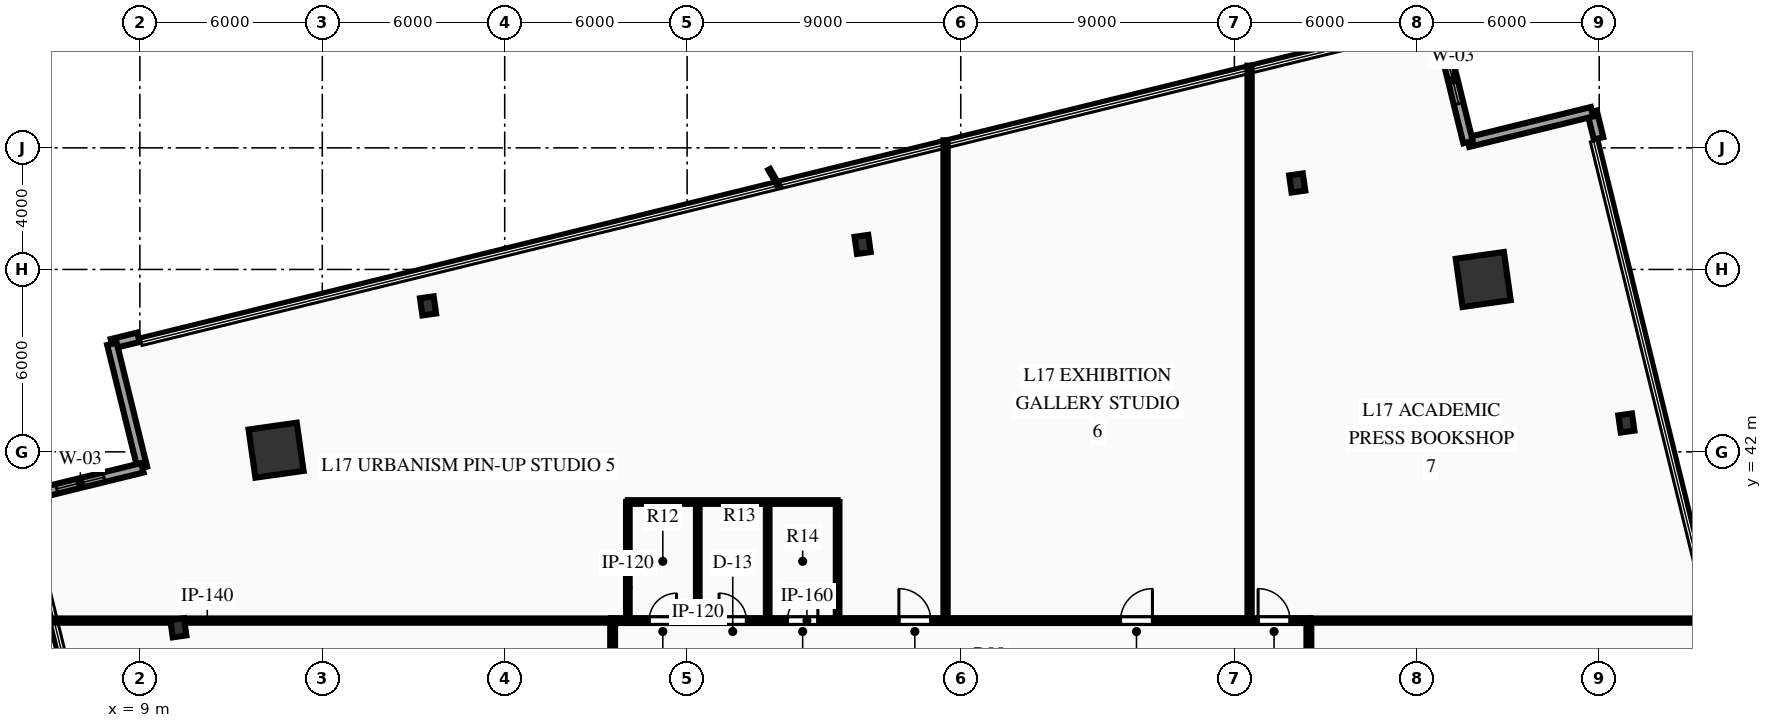
"""IFC4 building model, lengths in metres.
Left out: names, types, materials, properties, quantities, classifications, styles, units other than length and angle.
Written with IfcOpenShell. Run it as: python <this file> out.ifc"""

import sys

from ifc_helpers import new_model, si_unit, direction, frame, frame_2d, origin, origin_2d, place, context, subcontext, project, spatial, rectangle, hollow_rectangle, i_section, extrude, element, fill, save


model = new_model("IFC4")
c1 = context("Model", 3, precision=1e-05, world=origin(), true_north=direction((0.0, 1.0)))
c2 = subcontext(c1, "Body", "Model", "MODEL_VIEW")
j1 = project(units=[si_unit("LENGTHUNIT", "METRE"), si_unit("PLANEANGLEUNIT", "RADIAN")], contexts=[c1])
p1 = place(None, origin())
s1 = spatial("IfcSite", under=j1, at=p1, CompositionType="ELEMENT")
p2 = place(p1, origin())
s2 = spatial("IfcBuilding", under=s1, at=p2, CompositionType="ELEMENT")
p3 = place(p2, frame((0.0, 0.0, 73.95)))
s3 = spatial("IfcBuildingStorey", under=s2, at=p3, CompositionType="ELEMENT", Elevation=73.95)
for number, where, z_axis, x_axis in (
    (1, (53.185, 47.67, 0.0), (0.0, 0.0, 1.0), (0.99, 0.14, 0.0)),
    (2, (13.48, 42.054, 0.0), (0.0, 0.0, 1.0), (0.99, 0.14, 0.0)),
):
    element("IfcColumn", number, at=place(p3, frame(where, z_axis=z_axis, x_axis=x_axis)), inside=s3, PredefinedType="COLUMN", context=c2, shape_type="SweptSolid", body=[
        extrude(hollow_rectangle(XDim=1.6, YDim=1.6, WallThickness=0.08, at=origin_2d()), origin(), (0.0, 0.0, 1.0), 3.75),
    ])
for number, where, z_axis, x_axis in (
    (3, (57.892, 42.949, 0.0), (0.0, 0.0, 1.0), (0.99, 0.14, 0.0)),
    (4, (47.066, 50.844, 0.0), (0.0, 0.0, 1.0), (0.99, 0.14, 0.0)),
    (5, (32.772, 48.823, 0.0), (0.0, 0.0, 1.0), (0.99, 0.14, 0.0)),
    (6, (18.479, 46.801, 0.0), (0.0, 0.0, 1.0), (0.99, 0.14, 0.0)),
    (7, (10.266, 36.213, 0.0), (0.0, 0.0, 1.0), (0.99, 0.14, 0.0)),
):
    element("IfcColumn", number, at=place(p3, frame(where, z_axis=z_axis, x_axis=x_axis)), inside=s3, PredefinedType="COLUMN", context=c2, shape_type="SweptSolid", body=[
        extrude(i_section(OverallWidth=0.454, OverallDepth=0.569, WebThickness=0.078, FlangeThickness=0.125, at=origin_2d()), origin(), (0.0, 0.0, 1.0), 3.75),
    ])
p4 = place(p3, frame((56.764, 53.188, 0.0), z_axis=(0.0, 0.0, 1.0), x_axis=(0.238704255463, -0.971092311999, 0.0)))
e8 = element("IfcWall", 8, at=p4, inside=s3, PredefinedType="STANDARD", context=c2, shape_type="SweptSolid", body=[
    extrude(rectangle(XDim=0.9, YDim=0.32, at=frame_2d((0.45, 0.0))), origin(), (0.0, 0.0, 1.0), 3.44),
])
p5 = place(p3, frame((52.685, 52.186, 0.0), z_axis=(0.0, 0.0, 1.0), x_axis=(0.971129335226, 0.238553587824, 0.0)))
e9 = element("IfcWall", 9, at=p5, inside=s3, PredefinedType="STANDARD", context=c2, shape_type="SweptSolid", body=[
    extrude(rectangle(XDim=4.2, YDim=0.32, at=frame_2d((2.1, 0.0))), origin(), (0.0, 0.0, 1.0), 3.44),
])
p6 = place(p3, frame((51.684, 56.265, 0.0), z_axis=(0.0, 0.0, 1.0), x_axis=(0.238498767477, -0.971142799959, 0.0)))
e10 = element("IfcWall", 10, at=p6, inside=s3, PredefinedType="STANDARD", context=c2, shape_type="SweptSolid", body=[
    extrude(rectangle(XDim=4.2, YDim=0.32, at=frame_2d((2.1, 0.0))), origin(), (0.0, 0.0, 1.0), 3.44),
])
p7 = place(p6, frame((1.3, 0.0, 0.85)))
e11 = element("IfcOpeningElement", 11, at=p7, cuts=e10, PredefinedType="OPENING", context=c2, shape_type="SweptSolid", body=[
    extrude(rectangle(XDim=1.6, YDim=2.1, at=frame_2d((0.8, 1.05))), frame((0.0, 0.17, 0.0), z_axis=(0.0, -1.0, 0.0), x_axis=(1.0, 0.0, 0.0)), (0.0, 0.0, 1.0), 0.34),
])
p8 = place(p3, frame((8.08, 45.554, 0.0), z_axis=(0.0, 0.0, 1.0), x_axis=(0.971092311999, 0.238704255463, 0.0)))
e12 = element("IfcWall", 12, at=p8, inside=s3, PredefinedType="STANDARD", context=c2, shape_type="SweptSolid", body=[
    extrude(rectangle(XDim=0.9, YDim=0.32, at=frame_2d((0.45, 0.0))), origin(), (0.0, 0.0, 1.0), 3.44),
])
p9 = place(p3, frame((9.082, 41.476, 0.0), z_axis=(0.0, 0.0, 1.0), x_axis=(-0.238567054654, 0.97112602706, 0.0)))
e13 = element("IfcWall", 13, at=p9, inside=s3, PredefinedType="STANDARD", context=c2, shape_type="SweptSolid", body=[
    extrude(rectangle(XDim=4.2, YDim=0.32, at=frame_2d((2.1, 0.0))), origin(), (0.0, 0.0, 1.0), 3.44),
])
p10 = place(p3, frame((5.003, 40.474, 0.0), z_axis=(0.0, 0.0, 1.0), x_axis=(0.971129335226, 0.238553587824, 0.0)))
e14 = element("IfcWall", 14, at=p10, inside=s3, PredefinedType="STANDARD", context=c2, shape_type="SweptSolid", body=[
    extrude(rectangle(XDim=4.2, YDim=0.32, at=frame_2d((2.1, 0.0))), origin(), (0.0, 0.0, 1.0), 3.44),
])
p11 = place(p10, frame((1.3, 0.0, 0.85)))
e15 = element("IfcOpeningElement", 15, at=p11, cuts=e14, PredefinedType="OPENING", context=c2, shape_type="SweptSolid", body=[
    extrude(rectangle(XDim=1.6, YDim=2.1, at=frame_2d((0.8, 1.05))), frame((0.0, 0.17, 0.0), z_axis=(0.0, -1.0, 0.0), x_axis=(1.0, 0.0, 0.0)), (0.0, 0.0, 1.0), 0.34),
])
p12 = place(p3, frame((24.5, 36.45, 0.0), z_axis=(0.0, 0.0, 1.0), x_axis=(1.0, 0.0, 0.0)))
e16 = element("IfcWall", 16, at=p12, inside=s3, PredefinedType="PARTITIONING", context=c2, shape_type="SweptSolid", body=[
    extrude(rectangle(XDim=23.0, YDim=0.16, at=frame_2d((11.5, 0.0))), origin(), (0.0, 0.0, 1.0), 3.44),
])
p13 = place(p12, frame((1.25, 0.0, 0.0)))
e17 = element("IfcOpeningElement", 17, at=p13, cuts=e16, PredefinedType="OPENING", context=c2, shape_type="SweptSolid", body=[
    extrude(rectangle(XDim=0.9, YDim=2.15, at=frame_2d((0.45, 1.075))), frame((0.0, 0.09, 0.0), z_axis=(0.0, -1.0, 0.0), x_axis=(1.0, 0.0, 0.0)), (0.0, 0.0, 1.0), 0.18),
])
p14 = place(p12, frame((3.55, 0.0, 0.0)))
e18 = element("IfcOpeningElement", 18, at=p14, cuts=e16, PredefinedType="OPENING", context=c2, shape_type="SweptSolid", body=[
    extrude(rectangle(XDim=0.9, YDim=2.15, at=frame_2d((0.45, 1.075))), frame((0.0, 0.09, 0.0), z_axis=(0.0, -1.0, 0.0), x_axis=(1.0, 0.0, 0.0)), (0.0, 0.0, 1.0), 0.18),
])
p15 = place(p12, frame((5.8, 0.0, 0.0)))
e19 = element("IfcOpeningElement", 19, at=p15, cuts=e16, PredefinedType="OPENING", context=c2, shape_type="SweptSolid", body=[
    extrude(rectangle(XDim=1.0, YDim=2.15, at=frame_2d((0.5, 1.075))), frame((0.0, 0.09, 0.0), z_axis=(0.0, -1.0, 0.0), x_axis=(1.0, 0.0, 0.0)), (0.0, 0.0, 1.0), 0.18),
])
p16 = place(p12, frame((9.465, 0.0, 0.0)))
e20 = element("IfcOpeningElement", 20, at=p16, cuts=e16, PredefinedType="OPENING", context=c2, shape_type="SweptSolid", body=[
    extrude(rectangle(XDim=1.05, YDim=2.15, at=frame_2d((0.525, 1.075))), frame((0.0, 0.09, 0.0), z_axis=(0.0, -1.0, 0.0), x_axis=(1.0, 0.0, 0.0)), (0.0, 0.0, 1.0), 0.18),
])
p17 = place(p12, frame((16.755, 0.0, 0.0)))
e21 = element("IfcOpeningElement", 21, at=p17, cuts=e16, PredefinedType="OPENING", context=c2, shape_type="SweptSolid", body=[
    extrude(rectangle(XDim=1.05, YDim=2.15, at=frame_2d((0.525, 1.075))), frame((0.0, 0.09, 0.0), z_axis=(0.0, -1.0, 0.0), x_axis=(1.0, 0.0, 0.0)), (0.0, 0.0, 1.0), 0.18),
])
p18 = place(p12, frame((21.28, 0.0, 0.0)))
e22 = element("IfcOpeningElement", 22, at=p18, cuts=e16, PredefinedType="OPENING", context=c2, shape_type="SweptSolid", body=[
    extrude(rectangle(XDim=1.05, YDim=2.15, at=frame_2d((0.525, 1.075))), frame((0.0, 0.09, 0.0), z_axis=(0.0, -1.0, 0.0), x_axis=(1.0, 0.0, 0.0)), (0.0, 0.0, 1.0), 0.18),
])
p19 = place(p3, frame((24.55, 15.55, 0.0), z_axis=(0.0, 0.0, 1.0), x_axis=(0.0, 1.0, 0.0)))
e23 = element("IfcWall", 23, at=p19, inside=s3, PredefinedType="PARTITIONING", context=c2, shape_type="SweptSolid", body=[
    extrude(rectangle(XDim=20.9, YDim=0.16, at=frame_2d((10.45, 0.0))), origin(), (0.0, 0.0, 1.0), 3.44),
])
p20 = place(p19, frame((1.862, 0.0, 0.0)))
e24 = element("IfcOpeningElement", 24, at=p20, cuts=e23, PredefinedType="OPENING", context=c2, shape_type="SweptSolid", body=[
    extrude(rectangle(XDim=1.05, YDim=2.15, at=frame_2d((0.525, 1.075))), frame((0.0, 0.09, 0.0), z_axis=(0.0, -1.0, 0.0), x_axis=(1.0, 0.0, 0.0)), (0.0, 0.0, 1.0), 0.18),
])
p21 = place(p19, frame((10.509, 0.0, 0.0)))
e25 = element("IfcOpeningElement", 25, at=p21, cuts=e23, PredefinedType="OPENING", context=c2, shape_type="SweptSolid", body=[
    extrude(rectangle(XDim=1.05, YDim=2.15, at=frame_2d((0.525, 1.075))), frame((0.0, 0.09, 0.0), z_axis=(0.0, -1.0, 0.0), x_axis=(1.0, 0.0, 0.0)), (0.0, 0.0, 1.0), 0.18),
])
p22 = place(p19, frame((15.426, 0.0, 0.0)))
e26 = element("IfcOpeningElement", 26, at=p22, cuts=e23, PredefinedType="OPENING", context=c2, shape_type="SweptSolid", body=[
    extrude(rectangle(XDim=1.05, YDim=2.15, at=frame_2d((0.525, 1.075))), frame((0.0, 0.09, 0.0), z_axis=(0.0, -1.0, 0.0), x_axis=(1.0, 0.0, 0.0)), (0.0, 0.0, 1.0), 0.18),
])
p23 = place(p3, frame((47.45, 15.55, 0.0), z_axis=(0.0, 0.0, 1.0), x_axis=(0.0, 1.0, 0.0)))
e27 = element("IfcWall", 27, at=p23, inside=s3, PredefinedType="PARTITIONING", context=c2, shape_type="SweptSolid", body=[
    extrude(rectangle(XDim=20.9, YDim=0.16, at=frame_2d((10.45, 0.0))), origin(), (0.0, 0.0, 1.0), 3.44),
])
p24 = place(p23, frame((5.616, 0.0, 0.0)))
e28 = element("IfcOpeningElement", 28, at=p24, cuts=e27, PredefinedType="OPENING", context=c2, shape_type="SweptSolid", body=[
    extrude(rectangle(XDim=1.05, YDim=2.15, at=frame_2d((0.525, 1.075))), frame((0.0, 0.09, 0.0), z_axis=(0.0, -1.0, 0.0), x_axis=(1.0, 0.0, 0.0)), (0.0, 0.0, 1.0), 0.18),
])
p25 = place(p23, frame((17.405, 0.0, 0.0)))
e29 = element("IfcOpeningElement", 29, at=p25, cuts=e27, PredefinedType="OPENING", context=c2, shape_type="SweptSolid", body=[
    extrude(rectangle(XDim=1.05, YDim=2.15, at=frame_2d((0.525, 1.075))), frame((0.0, 0.09, 0.0), z_axis=(0.0, -1.0, 0.0), x_axis=(1.0, 0.0, 0.0)), (0.0, 0.0, 1.0), 0.18),
])
for number, where, z_axis, x_axis in (
    (30, (25.05, 36.45, 0.0), (0.0, 0.0, 1.0), (0.0, 1.0, 0.0)),
    (31, (27.35, 36.45, 0.0), (0.0, 0.0, 1.0), (0.0, 1.0, 0.0)),
    (32, (29.65, 36.45, 0.0), (0.0, 0.0, 1.0), (0.0, 1.0, 0.0)),
    (33, (31.95, 36.45, 0.0), (0.0, 0.0, 1.0), (0.0, 1.0, 0.0)),
):
    element("IfcWall", number, at=place(p3, frame(where, z_axis=z_axis, x_axis=x_axis)), inside=s3, PredefinedType="PARTITIONING", context=c2, shape_type="SweptSolid", body=[
        extrude(rectangle(XDim=3.9, YDim=0.12, at=frame_2d((1.95, 0.0))), origin(), (0.0, 0.0, 1.0), 3.44),
    ])
p26 = place(p3, frame((25.05, 40.35, 0.0), z_axis=(0.0, 0.0, 1.0), x_axis=(1.0, 0.0, 0.0)))
e34 = element("IfcWall", 34, at=p26, inside=s3, PredefinedType="PARTITIONING", context=c2, shape_type="SweptSolid", body=[
    extrude(rectangle(XDim=6.9, YDim=0.12, at=frame_2d((3.45, 0.0))), origin(), (0.0, 0.0, 1.0), 3.44),
])
p27 = place(p3, frame((6.032, 36.45, 0.0), z_axis=(0.0, 0.0, 1.0), x_axis=(1.0, 0.0, 0.0)))
e35 = element("IfcWall", 35, at=p27, inside=s3, PredefinedType="PARTITIONING", context=c2, shape_type="SweptSolid", body=[
    extrude(rectangle(XDim=18.518, YDim=0.14, at=frame_2d((9.259, 0.0))), origin(), (0.0, 0.0, 1.0), 2.972),
])
p28 = place(p3, frame((47.45, 36.45, 0.0), z_axis=(0.0, 0.0, 1.0), x_axis=(1.0, 0.0, 0.0)))
e36 = element("IfcWall", 36, at=p28, inside=s3, PredefinedType="PARTITIONING", context=c2, shape_type="SweptSolid", body=[
    extrude(rectangle(XDim=13.384, YDim=0.14, at=frame_2d((6.692, 0.0))), origin(), (0.0, 0.0, 1.0), 3.44),
])
p29 = place(p3, frame((35.5, 36.45, 0.0), z_axis=(0.0, 0.0, 1.0), x_axis=(0.0, 1.0, 0.0)))
e37 = element("IfcWall", 37, at=p29, inside=s3, PredefinedType="PARTITIONING", context=c2, shape_type="SweptSolid", body=[
    extrude(rectangle(XDim=15.798, YDim=0.14, at=frame_2d((7.899, 0.0))), origin(), (0.0, 0.0, 1.0), 3.44),
])
p30 = place(p3, frame((45.5, 36.45, 0.0), z_axis=(0.0, 0.0, 1.0), x_axis=(0.0, 1.0, 0.0)))
e38 = element("IfcWall", 38, at=p30, inside=s3, PredefinedType="PARTITIONING", context=c2, shape_type="SweptSolid", body=[
    extrude(rectangle(XDim=18.255, YDim=0.14, at=frame_2d((9.127, 0.0))), origin(), (0.0, 0.0, 1.0), 2.972),
])
p31 = place(p7, origin())
e39 = element("IfcWindow", 39, at=p31, inside=s3, PartitioningType="SINGLE_PANEL", PredefinedType="WINDOW", context=c2, shape_type="SweptSolid", body=[
    extrude(rectangle(XDim=1.6, YDim=2.1, at=frame_2d((0.8, 1.05))), frame((0.0, 0.03, 0.0), z_axis=(0.0, -1.0, 0.0), x_axis=(1.0, 0.0, 0.0)), (0.0, 0.0, 1.0), 0.06),
])
fill(e11, e39)
p32 = place(p11, origin())
e40 = element("IfcWindow", 40, at=p32, inside=s3, PartitioningType="SINGLE_PANEL", PredefinedType="WINDOW", context=c2, shape_type="SweptSolid", body=[
    extrude(rectangle(XDim=1.6, YDim=2.1, at=frame_2d((0.8, 1.05))), frame((0.0, 0.03, 0.0), z_axis=(0.0, -1.0, 0.0), x_axis=(1.0, 0.0, 0.0)), (0.0, 0.0, 1.0), 0.06),
])
fill(e15, e40)
p33 = place(p13, origin())
e41 = element("IfcDoor", 41, at=p33, inside=s3, OperationType="SINGLE_SWING_RIGHT", PredefinedType="DOOR", context=c2, shape_type="SweptSolid", body=[
    extrude(rectangle(XDim=0.9, YDim=2.15, at=frame_2d((0.45, 1.075))), frame((0.0, 0.025, 0.0), z_axis=(0.0, -1.0, 0.0), x_axis=(1.0, 0.0, 0.0)), (0.0, 0.0, 1.0), 0.05),
])
fill(e17, e41)
p34 = place(p14, origin())
e42 = element("IfcDoor", 42, at=p34, inside=s3, OperationType="SINGLE_SWING_LEFT", PredefinedType="DOOR", context=c2, shape_type="SweptSolid", body=[
    extrude(rectangle(XDim=0.9, YDim=2.15, at=frame_2d((0.45, 1.075))), frame((0.0, 0.025, 0.0), z_axis=(0.0, -1.0, 0.0), x_axis=(1.0, 0.0, 0.0)), (0.0, 0.0, 1.0), 0.05),
])
fill(e18, e42)
p35 = place(p15, origin())
e43 = element("IfcDoor", 43, at=p35, inside=s3, OperationType="SINGLE_SWING_RIGHT", PredefinedType="DOOR", context=c2, shape_type="SweptSolid", body=[
    extrude(rectangle(XDim=1.0, YDim=2.15, at=frame_2d((0.5, 1.075))), frame((0.0, 0.025, 0.0), z_axis=(0.0, -1.0, 0.0), x_axis=(1.0, 0.0, 0.0)), (0.0, 0.0, 1.0), 0.05),
])
fill(e19, e43)
p36 = place(p16, origin())
e44 = element("IfcDoor", 44, at=p36, inside=s3, OperationType="SINGLE_SWING_LEFT", PredefinedType="DOOR", context=c2, shape_type="SweptSolid", body=[
    extrude(rectangle(XDim=1.05, YDim=2.15, at=frame_2d((0.525, 1.075))), frame((0.0, 0.025, 0.0), z_axis=(0.0, -1.0, 0.0), x_axis=(1.0, 0.0, 0.0)), (0.0, 0.0, 1.0), 0.05),
])
fill(e20, e44)
p37 = place(p17, origin())
e45 = element("IfcDoor", 45, at=p37, inside=s3, OperationType="SINGLE_SWING_RIGHT", PredefinedType="DOOR", context=c2, shape_type="SweptSolid", body=[
    extrude(rectangle(XDim=1.05, YDim=2.15, at=frame_2d((0.525, 1.075))), frame((0.0, 0.025, 0.0), z_axis=(0.0, -1.0, 0.0), x_axis=(1.0, 0.0, 0.0)), (0.0, 0.0, 1.0), 0.05),
])
fill(e21, e45)
p38 = place(p18, origin())
e46 = element("IfcDoor", 46, at=p38, inside=s3, OperationType="SINGLE_SWING_LEFT", PredefinedType="DOOR", context=c2, shape_type="SweptSolid", body=[
    extrude(rectangle(XDim=1.05, YDim=2.15, at=frame_2d((0.525, 1.075))), frame((0.0, 0.025, 0.0), z_axis=(0.0, -1.0, 0.0), x_axis=(1.0, 0.0, 0.0)), (0.0, 0.0, 1.0), 0.05),
])
fill(e22, e46)
save(model, sys.argv[1])
